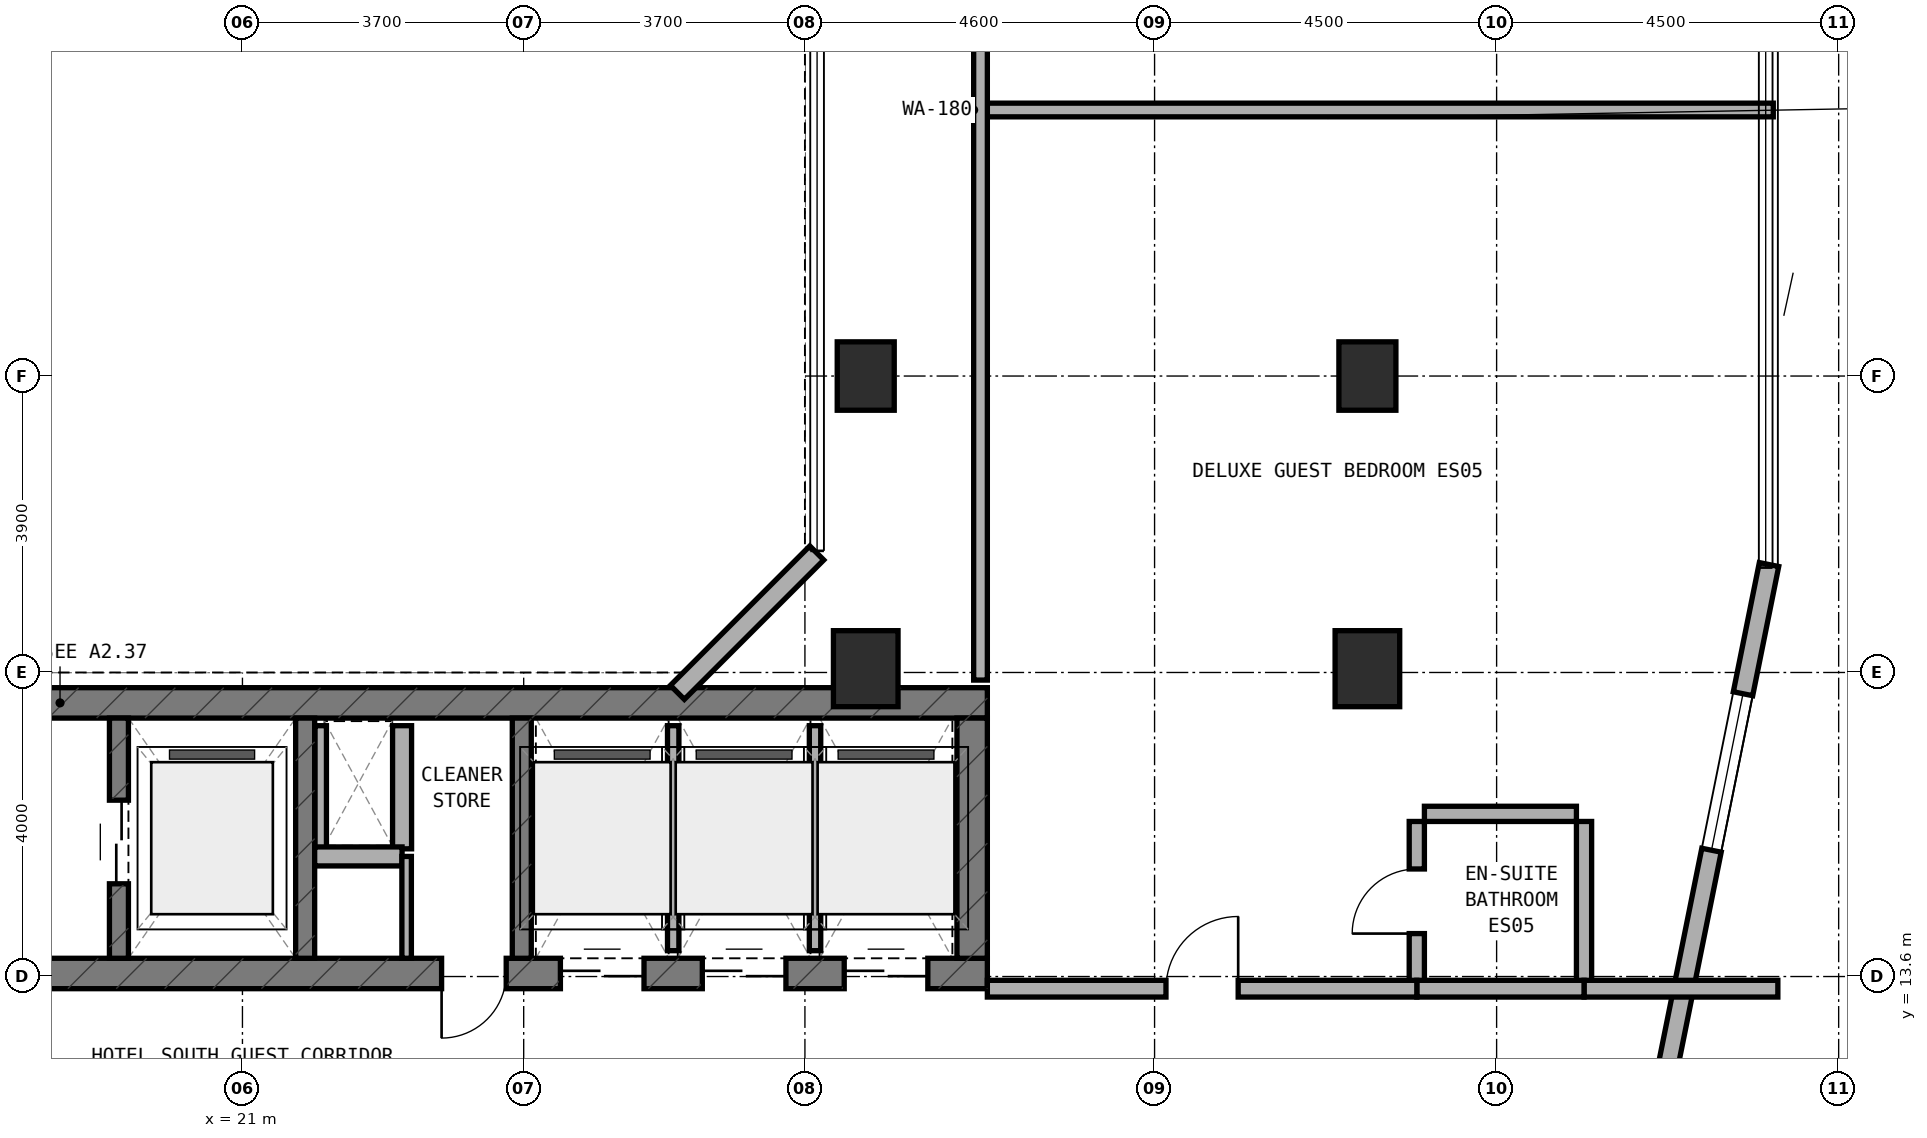
"""IFC4 building model, lengths in metres.
Left out: names, types, materials, properties, quantities, classifications, styles, units other than length and angle.
Written with IfcOpenShell. Run it as: python <this file> out.ifc"""

import sys

from ifc_helpers import new_model, si_unit, direction, frame, frame_2d, origin, origin_2d, place, context, subcontext, project, spatial, rectangle, extrude, element, fill, save


model = new_model("IFC4")
c1 = context("Model", 3, precision=1e-05, world=origin(), true_north=direction((0.0, 1.0)))
c2 = subcontext(c1, "Body", "Model", "MODEL_VIEW")
j1 = project(units=[si_unit("LENGTHUNIT", "METRE"), si_unit("PLANEANGLEUNIT", "RADIAN")], contexts=[c1])
p1 = place(None, origin())
s1 = spatial("IfcSite", under=j1, at=p1, CompositionType="ELEMENT")
p2 = place(p1, origin())
s2 = spatial("IfcBuilding", under=s1, at=p2, CompositionType="ELEMENT")
p3 = place(p2, frame((0.0, 0.0, 166.0)))
s3 = spatial("IfcBuildingStorey", under=s2, at=p3, CompositionType="ELEMENT", Elevation=166.0)
p4 = place(p3, frame((6.4, 13.64, 0.0), z_axis=(0.0, 0.0, 1.0), x_axis=(1.0, 0.0, 0.0)))
e1 = element("IfcWall", 1, at=p4, inside=s3, PredefinedType="SHEAR", context=c2, shape_type="SweptSolid", body=[
    extrude(rectangle(XDim=24.4, YDim=0.4, at=frame_2d((12.2, 0.0))), origin(), (0.0, 0.0, 1.0), 3.5),
])
p5 = place(p4, frame((9.15, 0.0, 0.0)))
e2 = element("IfcOpeningElement", 2, at=p5, cuts=e1, PredefinedType="OPENING", context=c2, shape_type="SweptSolid", body=[
    extrude(rectangle(XDim=1.2, YDim=2.15, at=frame_2d((0.6, 1.075))), frame((0.0, 0.21, 0.0), z_axis=(0.0, -1.0, 0.0), x_axis=(1.0, 0.0, 0.0)), (0.0, 0.0, 1.0), 0.42),
])
p6 = place(p4, frame((17.22, 0.0, 0.0)))
e3 = element("IfcOpeningElement", 3, at=p6, cuts=e1, PredefinedType="OPENING", context=c2, shape_type="SweptSolid", body=[
    extrude(rectangle(XDim=0.85, YDim=2.1, at=frame_2d((0.425, 1.05))), frame((0.0, 0.21, 0.0), z_axis=(0.0, -1.0, 0.0), x_axis=(1.0, 0.0, 0.0)), (0.0, 0.0, 1.0), 0.42),
])
p7 = place(p4, frame((18.783, 0.0, 0.0)))
e4 = element("IfcOpeningElement", 4, at=p7, cuts=e1, PredefinedType="OPENING", context=c2, shape_type="SweptSolid", body=[
    extrude(rectangle(XDim=1.1, YDim=2.15, at=frame_2d((0.55, 1.075))), frame((0.0, 0.21, 0.0), z_axis=(0.0, -1.0, 0.0), x_axis=(1.0, 0.0, 0.0)), (0.0, 0.0, 1.0), 0.42),
])
p8 = place(p4, frame((20.65, 0.0, 0.0)))
e5 = element("IfcOpeningElement", 5, at=p8, cuts=e1, PredefinedType="OPENING", context=c2, shape_type="SweptSolid", body=[
    extrude(rectangle(XDim=1.1, YDim=2.15, at=frame_2d((0.55, 1.075))), frame((0.0, 0.21, 0.0), z_axis=(0.0, -1.0, 0.0), x_axis=(1.0, 0.0, 0.0)), (0.0, 0.0, 1.0), 0.42),
])
p9 = place(p4, frame((22.517, 0.0, 0.0)))
e6 = element("IfcOpeningElement", 6, at=p9, cuts=e1, PredefinedType="OPENING", context=c2, shape_type="SweptSolid", body=[
    extrude(rectangle(XDim=1.1, YDim=2.15, at=frame_2d((0.55, 1.075))), frame((0.0, 0.21, 0.0), z_axis=(0.0, -1.0, 0.0), x_axis=(1.0, 0.0, 0.0)), (0.0, 0.0, 1.0), 0.42),
])
p10 = place(p3, frame((6.4, 17.2, 0.0), z_axis=(0.0, 0.0, 1.0), x_axis=(1.0, 0.0, 0.0)))
e7 = element("IfcWall", 7, at=p10, inside=s3, PredefinedType="SHEAR", context=c2, shape_type="SweptSolid", body=[
    extrude(rectangle(XDim=24.4, YDim=0.4, at=frame_2d((12.2, 0.0))), origin(), (0.0, 0.0, 1.0), 3.5),
])
p11 = place(p3, frame((30.6, 13.84, 0.0), z_axis=(0.0, 0.0, 1.0), x_axis=(0.0, 1.0, 0.0)))
e8 = element("IfcWall", 8, at=p11, inside=s3, PredefinedType="SHEAR", context=c2, shape_type="SweptSolid", body=[
    extrude(rectangle(XDim=3.16, YDim=0.4, at=frame_2d((1.58, 0.0))), origin(), (0.0, 0.0, 1.0), 3.5),
])
p12 = place(p3, frame((19.375, 13.84, 0.0), z_axis=(0.0, 0.0, 1.0), x_axis=(0.0, 1.0, 0.0)))
e9 = element("IfcWall", 9, at=p12, inside=s3, PredefinedType="STANDARD", context=c2, shape_type="SweptSolid", body=[
    extrude(rectangle(XDim=3.16, YDim=0.25, at=frame_2d((1.58, 0.0))), origin(), (0.0, 0.0, 1.0), 3.22),
])
p13 = place(p12, frame((0.98, 0.0, 0.0)))
e10 = element("IfcOpeningElement", 10, at=p13, cuts=e9, PredefinedType="OPENING", context=c2, shape_type="SweptSolid", body=[
    extrude(rectangle(XDim=1.1, YDim=2.15, at=frame_2d((0.55, 1.075))), frame((0.0, 0.135, 0.0), z_axis=(0.0, -1.0, 0.0), x_axis=(1.0, 0.0, 0.0)), (0.0, 0.0, 1.0), 0.27),
])
for number, where, z_axis, x_axis in (
    (11, (21.825, 13.84, 0.0), (0.0, 0.0, 1.0), (0.0, 1.0, 0.0)),
    (12, (24.675, 13.84, 0.0), (0.0, 0.0, 1.0), (0.0, 1.0, 0.0)),
):
    element("IfcWall", number, at=place(p3, frame(where, z_axis=z_axis, x_axis=x_axis)), inside=s3, PredefinedType="STANDARD", context=c2, shape_type="SweptSolid", body=[
        extrude(rectangle(XDim=3.16, YDim=0.25, at=frame_2d((1.58, 0.0))), origin(), (0.0, 0.0, 1.0), 3.22),
    ])
p14 = place(p3, frame((35.8, 21.5, 0.0), z_axis=(0.0, 0.0, 1.0), x_axis=(1.0, 0.0, 0.0)))
e13 = element("IfcColumn", 13, at=p14, inside=s3, PredefinedType="COLUMN", context=c2, shape_type="SweptSolid", body=[
    extrude(rectangle(XDim=0.75, YDim=0.9, at=origin_2d()), origin(), (0.0, 0.0, 1.0), 3.5),
])
for number, where, z_axis, x_axis in (
    (14, (35.8, 17.65, 0.0), (0.0, 0.0, 1.0), (1.0, 0.0, 0.0)),
    (15, (29.2, 17.65, 0.0), (0.0, 0.0, 1.0), (1.0, 0.0, 0.0)),
):
    element("IfcColumn", number, at=place(p3, frame(where, z_axis=z_axis, x_axis=x_axis)), inside=s3, PredefinedType="COLUMN", context=c2, shape_type="SweptSolid", body=[
        extrude(rectangle(XDim=0.85, YDim=1.0, at=origin_2d()), origin(), (0.0, 0.0, 1.0), 3.5),
    ])
p15 = place(p3, frame((29.2, 21.5, 0.0), z_axis=(0.0, 0.0, 1.0), x_axis=(1.0, 0.0, 0.0)))
e16 = element("IfcColumn", 16, at=p15, inside=s3, PredefinedType="COLUMN", context=c2, shape_type="SweptSolid", body=[
    extrude(rectangle(XDim=0.75, YDim=0.9, at=origin_2d()), origin(), (0.0, 0.0, 1.0), 3.5),
])
p16 = place(p3, frame((39.271, 10.018, 0.0), z_axis=(0.0, 0.0, 1.0), x_axis=(0.197435082048, 0.980315963543, 0.0)))
e17 = element("IfcWall", 17, at=p16, inside=s3, PredefinedType="STANDARD", context=c2, shape_type="SweptSolid", body=[
    extrude(rectangle(XDim=9.183, YDim=0.26, at=frame_2d((4.591, 0.0))), origin(), (0.0, 0.0, 1.0), 3.22),
])
p17 = place(p16, frame((5.349, 0.0, 0.85)))
e18 = element("IfcOpeningElement", 18, at=p17, cuts=e17, PredefinedType="OPENING", context=c2, shape_type="SweptSolid", body=[
    extrude(rectangle(XDim=2.1, YDim=1.5, at=frame_2d((1.05, 0.75))), frame((0.0, 0.14, 0.0), z_axis=(0.0, -1.0, 0.0), x_axis=(1.0, 0.0, 0.0)), (0.0, 0.0, 1.0), 0.28),
])
p18 = place(p3, frame((26.722, 17.338, 0.0), z_axis=(0.0, 0.0, 1.0), x_axis=(0.707059717605, 0.707153841636, 0.0)))
e19 = element("IfcWall", 19, at=p18, inside=s3, PredefinedType="STANDARD", context=c2, shape_type="SweptSolid", body=[
    extrude(rectangle(XDim=2.594, YDim=0.26, at=frame_2d((1.297, 0.0))), origin(), (0.0, 0.0, 1.0), 3.22),
])
p19 = place(p3, frame((22.03, 15.28, 0.0), z_axis=(0.0, 0.0, 1.0), x_axis=(0.0, 1.0, 0.0)))
e20 = element("IfcWall", 20, at=p19, inside=s3, PredefinedType="PARTITIONING", context=c2, shape_type="SweptSolid", body=[
    extrude(rectangle(XDim=1.62, YDim=0.15, at=frame_2d((0.81, 0.0))), origin(), (0.0, 0.0, 1.0), 3.22),
])
p20 = place(p3, frame((23.1, 15.28, 0.0), z_axis=(0.0, 0.0, 1.0), x_axis=(0.0, 1.0, 0.0)))
e21 = element("IfcWall", 21, at=p20, inside=s3, PredefinedType="SOLIDWALL", context=c2, shape_type="SweptSolid", body=[
    extrude(rectangle(XDim=1.62, YDim=0.25, at=frame_2d((0.81, 0.0))), origin(), (0.0, 0.0, 1.0), 3.22),
])
p21 = place(p3, frame((21.95, 15.18, 0.0), z_axis=(0.0, 0.0, 1.0), x_axis=(1.0, 0.0, 0.0)))
e22 = element("IfcWall", 22, at=p21, inside=s3, PredefinedType="SOLIDWALL", context=c2, shape_type="SweptSolid", body=[
    extrude(rectangle(XDim=1.15, YDim=0.25, at=frame_2d((0.575, 0.0))), origin(), (0.0, 0.0, 1.0), 3.22),
])
p22 = place(p3, frame((23.16, 13.84, 0.0), z_axis=(0.0, 0.0, 1.0), x_axis=(0.0, 1.0, 0.0)))
e23 = element("IfcWall", 23, at=p22, inside=s3, PredefinedType="PARTITIONING", context=c2, shape_type="SweptSolid", body=[
    extrude(rectangle(XDim=1.34, YDim=0.125, at=frame_2d((0.67, 0.0))), origin(), (0.0, 0.0, 1.0), 3.22),
])
p23 = place(p3, frame((26.667, 13.94, 0.0), z_axis=(0.0, 0.0, 1.0), x_axis=(0.0, 1.0, 0.0)))
e24 = element("IfcWall", 24, at=p23, inside=s3, PredefinedType="PARTITIONING", context=c2, shape_type="SweptSolid", body=[
    extrude(rectangle(XDim=2.96, YDim=0.15, at=frame_2d((1.48, 0.0))), origin(), (0.0, 0.0, 1.0), 3.22),
])
p24 = place(p3, frame((28.533, 13.94, 0.0), z_axis=(0.0, 0.0, 1.0), x_axis=(0.0, 1.0, 0.0)))
e25 = element("IfcWall", 25, at=p24, inside=s3, PredefinedType="PARTITIONING", context=c2, shape_type="SweptSolid", body=[
    extrude(rectangle(XDim=2.96, YDim=0.15, at=frame_2d((1.48, 0.0))), origin(), (0.0, 0.0, 1.0), 2.795),
])
p25 = place(p3, frame((30.8, 25.0, 0.0), z_axis=(0.0, 0.0, 1.0), x_axis=(1.0, 0.0, 0.0)))
e26 = element("IfcWall", 26, at=p25, inside=s3, PredefinedType="SOLIDWALL", context=c2, shape_type="SweptSolid", body=[
    extrude(rectangle(XDim=10.34, YDim=0.18, at=frame_2d((5.17, 0.0))), origin(), (0.0, 0.0, 1.0), 2.835),
])
p26 = place(p3, frame((30.71, 17.5, 0.0), z_axis=(0.0, 0.0, 1.0), x_axis=(0.0, 1.0, 0.0)))
e27 = element("IfcWall", 27, at=p26, inside=s3, PredefinedType="SOLIDWALL", context=c2, shape_type="SweptSolid", body=[
    extrude(rectangle(XDim=15.0, YDim=0.18, at=frame_2d((7.5, 0.0))), origin(), (0.0, 0.0, 1.0), 2.795),
])
p27 = place(p3, frame((36.45, 13.54, 0.0), z_axis=(0.0, 0.0, 1.0), x_axis=(0.0, 1.0, 0.0)))
e28 = element("IfcWall", 28, at=p27, inside=s3, PredefinedType="PLUMBINGWALL", context=c2, shape_type="SweptSolid", body=[
    extrude(rectangle(XDim=2.1, YDim=0.2, at=frame_2d((1.05, 0.0))), origin(), (0.0, 0.0, 1.0), 3.22),
])
p28 = place(p27, frame((0.625, 0.0, 0.0)))
e29 = element("IfcOpeningElement", 29, at=p28, cuts=e28, PredefinedType="OPENING", context=c2, shape_type="SweptSolid", body=[
    extrude(rectangle(XDim=0.85, YDim=2.1, at=frame_2d((0.425, 1.05))), frame((0.0, 0.11, 0.0), z_axis=(0.0, -1.0, 0.0), x_axis=(1.0, 0.0, 0.0)), (0.0, 0.0, 1.0), 0.22),
])
p29 = place(p3, frame((36.55, 15.74, 0.0), z_axis=(0.0, 0.0, 1.0), x_axis=(1.0, 0.0, 0.0)))
e30 = element("IfcWall", 30, at=p29, inside=s3, PredefinedType="PLUMBINGWALL", context=c2, shape_type="SweptSolid", body=[
    extrude(rectangle(XDim=2.0, YDim=0.2, at=frame_2d((1.0, 0.0))), origin(), (0.0, 0.0, 1.0), 3.22),
])
p30 = place(p3, frame((38.65, 13.54, 0.0), z_axis=(0.0, 0.0, 1.0), x_axis=(0.0, 1.0, 0.0)))
e31 = element("IfcWall", 31, at=p30, inside=s3, PredefinedType="PLUMBINGWALL", context=c2, shape_type="SweptSolid", body=[
    extrude(rectangle(XDim=2.1, YDim=0.2, at=frame_2d((1.05, 0.0))), origin(), (0.0, 0.0, 1.0), 3.22),
])
p31 = place(p3, frame((38.65, 13.44, 0.0), z_axis=(0.0, 0.0, 1.0), x_axis=(1.0, 0.0, 0.0)))
e32 = element("IfcWall", 32, at=p31, inside=s3, PredefinedType="SOLIDWALL", context=c2, shape_type="SweptSolid", body=[
    extrude(rectangle(XDim=2.55, YDim=0.22, at=frame_2d((1.275, 0.0))), origin(), (0.0, 0.0, 1.0), 3.22),
])
p32 = place(p3, frame((36.45, 13.44, 0.0), z_axis=(0.0, 0.0, 1.0), x_axis=(1.0, 0.0, 0.0)))
e33 = element("IfcWall", 33, at=p32, inside=s3, PredefinedType="SOLIDWALL", context=c2, shape_type="SweptSolid", body=[
    extrude(rectangle(XDim=2.2, YDim=0.22, at=frame_2d((1.1, 0.0))), origin(), (0.0, 0.0, 1.0), 3.22),
])
p33 = place(p3, frame((30.8, 13.44, 0.0), z_axis=(0.0, 0.0, 1.0), x_axis=(1.0, 0.0, 0.0)))
e34 = element("IfcWall", 34, at=p33, inside=s3, PredefinedType="SOLIDWALL", context=c2, shape_type="SweptSolid", body=[
    extrude(rectangle(XDim=5.65, YDim=0.22, at=frame_2d((2.825, 0.0))), origin(), (0.0, 0.0, 1.0), 2.795),
])
p34 = place(p33, frame((2.35, 0.0, 0.0)))
e35 = element("IfcOpeningElement", 35, at=p34, cuts=e34, PredefinedType="OPENING", context=c2, shape_type="SweptSolid", body=[
    extrude(rectangle(XDim=0.95, YDim=2.1, at=frame_2d((0.475, 1.05))), frame((0.0, 0.12, 0.0), z_axis=(0.0, -1.0, 0.0), x_axis=(1.0, 0.0, 0.0)), (0.0, 0.0, 1.0), 0.24),
])
p35 = place(p17, origin())
e36 = element("IfcWindow", 36, at=p35, inside=s3, PartitioningType="SINGLE_PANEL", PredefinedType="WINDOW", context=c2, shape_type="SweptSolid", body=[
    extrude(rectangle(XDim=2.1, YDim=1.5, at=frame_2d((1.05, 0.75))), frame((0.0, 0.03, 0.0), z_axis=(0.0, -1.0, 0.0), x_axis=(1.0, 0.0, 0.0)), (0.0, 0.0, 1.0), 0.06),
])
fill(e18, e36)
p36 = place(p13, origin())
e37 = element("IfcDoor", 37, at=p36, inside=s3, OperationType="DOUBLE_DOOR_SLIDING", PredefinedType="DOOR", context=c2, shape_type="SweptSolid", body=[
    extrude(rectangle(XDim=1.1, YDim=2.15, at=frame_2d((0.55, 1.075))), frame((0.0, 0.025, 0.0), z_axis=(0.0, -1.0, 0.0), x_axis=(1.0, 0.0, 0.0)), (0.0, 0.0, 1.0), 0.05),
])
fill(e10, e37)
p37 = place(p6, frame((0.85, 0.0, 0.0), z_axis=(0.0, 0.0, 1.0), x_axis=(-1.0, 0.0, 0.0)))
e38 = element("IfcDoor", 38, at=p37, inside=s3, OperationType="SINGLE_SWING_RIGHT", PredefinedType="DOOR", context=c2, shape_type="SweptSolid", body=[
    extrude(rectangle(XDim=0.85, YDim=2.1, at=frame_2d((0.425, 1.05))), frame((0.0, 0.025, 0.0), z_axis=(0.0, -1.0, 0.0), x_axis=(1.0, 0.0, 0.0)), (0.0, 0.0, 1.0), 0.05),
])
fill(e3, e38)
p38 = place(p7, frame((1.1, 0.0, 0.0), z_axis=(0.0, 0.0, 1.0), x_axis=(-1.0, 0.0, 0.0)))
e39 = element("IfcDoor", 39, at=p38, inside=s3, OperationType="DOUBLE_DOOR_SLIDING", PredefinedType="DOOR", context=c2, shape_type="SweptSolid", body=[
    extrude(rectangle(XDim=1.1, YDim=2.15, at=frame_2d((0.55, 1.075))), frame((0.0, 0.025, 0.0), z_axis=(0.0, -1.0, 0.0), x_axis=(1.0, 0.0, 0.0)), (0.0, 0.0, 1.0), 0.05),
])
fill(e4, e39)
p39 = place(p8, frame((1.1, 0.0, 0.0), z_axis=(0.0, 0.0, 1.0), x_axis=(-1.0, 0.0, 0.0)))
e40 = element("IfcDoor", 40, at=p39, inside=s3, OperationType="DOUBLE_DOOR_SLIDING", PredefinedType="DOOR", context=c2, shape_type="SweptSolid", body=[
    extrude(rectangle(XDim=1.1, YDim=2.15, at=frame_2d((0.55, 1.075))), frame((0.0, 0.025, 0.0), z_axis=(0.0, -1.0, 0.0), x_axis=(1.0, 0.0, 0.0)), (0.0, 0.0, 1.0), 0.05),
])
fill(e5, e40)
p40 = place(p9, frame((1.1, 0.0, 0.0), z_axis=(0.0, 0.0, 1.0), x_axis=(-1.0, 0.0, 0.0)))
e41 = element("IfcDoor", 41, at=p40, inside=s3, OperationType="DOUBLE_DOOR_SLIDING", PredefinedType="DOOR", context=c2, shape_type="SweptSolid", body=[
    extrude(rectangle(XDim=1.1, YDim=2.15, at=frame_2d((0.55, 1.075))), frame((0.0, 0.025, 0.0), z_axis=(0.0, -1.0, 0.0), x_axis=(1.0, 0.0, 0.0)), (0.0, 0.0, 1.0), 0.05),
])
fill(e6, e41)
p41 = place(p28, origin())
e42 = element("IfcDoor", 42, at=p41, inside=s3, OperationType="SINGLE_SWING_LEFT", PredefinedType="DOOR", context=c2, shape_type="SweptSolid", body=[
    extrude(rectangle(XDim=0.85, YDim=2.1, at=frame_2d((0.425, 1.05))), frame((0.0, 0.025, 0.0), z_axis=(0.0, -1.0, 0.0), x_axis=(1.0, 0.0, 0.0)), (0.0, 0.0, 1.0), 0.05),
])
fill(e29, e42)
p42 = place(p34, origin())
e43 = element("IfcDoor", 43, at=p42, inside=s3, OperationType="SINGLE_SWING_RIGHT", PredefinedType="DOOR", context=c2, shape_type="SweptSolid", body=[
    extrude(rectangle(XDim=0.95, YDim=2.1, at=frame_2d((0.475, 1.05))), frame((0.0, 0.025, 0.0), z_axis=(0.0, -1.0, 0.0), x_axis=(1.0, 0.0, 0.0)), (0.0, 0.0, 1.0), 0.05),
])
fill(e35, e43)
save(model, sys.argv[1])
